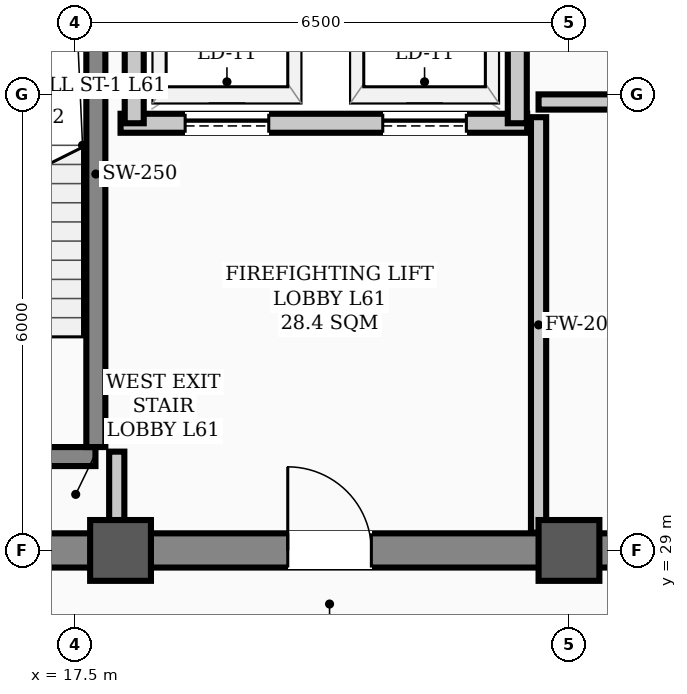
"""IFC4 building model, lengths in metres.
Left out: names, types, materials, properties, quantities, classifications, styles, units other than length and angle.
Written with IfcOpenShell. Run it as: python <this file> out.ifc"""

import sys

from ifc_helpers import new_model, si_unit, direction, frame, frame_2d, origin, origin_2d, place, context, subcontext, project, spatial, rectangle, hollow_rectangle, extrude, element, fill, save


model = new_model("IFC4")
c1 = context("Model", 3, precision=1e-05, world=origin(), true_north=direction((0.0, 1.0)))
c2 = subcontext(c1, "Body", "Model", "MODEL_VIEW")
j1 = project(units=[si_unit("LENGTHUNIT", "METRE"), si_unit("PLANEANGLEUNIT", "RADIAN")], contexts=[c1])
p1 = place(None, origin())
s1 = spatial("IfcSite", under=j1, at=p1, CompositionType="ELEMENT")
p2 = place(p1, origin())
s2 = spatial("IfcBuilding", under=s1, at=p2, CompositionType="ELEMENT")
p3 = place(p2, frame((0.0, 0.0, 246.2)))
s3 = spatial("IfcBuildingStorey", under=s2, at=p3, CompositionType="ELEMENT", Elevation=246.2)
for number, where, z_axis, x_axis in (
    (1, (18.1, 29.0, 0.0), (0.0, 0.0, 1.0), (1.0, 0.0, 0.0)),
    (2, (24.0, 29.0, 0.0), (0.0, 0.0, 1.0), (1.0, 0.0, 0.0)),
):
    element("IfcColumn", number, at=place(p3, frame(where, z_axis=z_axis, x_axis=x_axis)), inside=s3, PredefinedType="COLUMN", context=c2, shape_type="SweptSolid", body=[
        extrude(hollow_rectangle(XDim=0.8, YDim=0.8, WallThickness=0.032, InnerFilletRadius=0.016, OuterFilletRadius=0.048, at=origin_2d()), origin(), (0.0, 0.0, 1.0), 3.9),
    ])
p4 = place(p3, frame((13.5, 29.0, 0.0), z_axis=(0.0, 0.0, 1.0), x_axis=(1.0, 0.0, 0.0)))
e3 = element("IfcWall", 3, at=p4, inside=s3, PredefinedType="SHEAR", context=c2, shape_type="SweptSolid", body=[
    extrude(rectangle(XDim=30.5, YDim=0.45, at=frame_2d((15.25, 0.0))), origin(), (0.0, 0.0, 1.0), 3.72),
])
p5 = place(p4, frame((1.75, 0.0, 0.0)))
e4 = element("IfcOpeningElement", 4, at=p5, cuts=e3, PredefinedType="OPENING", context=c2, shape_type="SweptSolid", body=[
    extrude(rectangle(XDim=1.1, YDim=2.08, at=frame_2d((0.55, 1.04))), frame((0.0, 0.235, 0.0), z_axis=(0.0, -1.0, 0.0), x_axis=(1.0, 0.0, 0.0)), (0.0, 0.0, 1.0), 0.47),
])
p6 = place(p4, frame((26.7, 0.0, 0.0)))
e5 = element("IfcOpeningElement", 5, at=p6, cuts=e3, PredefinedType="OPENING", context=c2, shape_type="SweptSolid", body=[
    extrude(rectangle(XDim=1.1, YDim=2.08, at=frame_2d((0.55, 1.04))), frame((0.0, 0.235, 0.0), z_axis=(0.0, -1.0, 0.0), x_axis=(1.0, 0.0, 0.0)), (0.0, 0.0, 1.0), 0.47),
])
p7 = place(p4, frame((6.8, 0.0, 0.0)))
e6 = element("IfcOpeningElement", 6, at=p7, cuts=e3, PredefinedType="OPENING", context=c2, shape_type="SweptSolid", body=[
    extrude(rectangle(XDim=1.1, YDim=2.08, at=frame_2d((0.55, 1.04))), frame((0.0, 0.235, 0.0), z_axis=(0.0, -1.0, 0.0), x_axis=(1.0, 0.0, 0.0)), (0.0, 0.0, 1.0), 0.47),
])
p8 = place(p4, frame((13.2, 0.0, 0.0)))
e7 = element("IfcOpeningElement", 7, at=p8, cuts=e3, PredefinedType="OPENING", context=c2, shape_type="SweptSolid", body=[
    extrude(rectangle(XDim=1.6, YDim=2.08, at=frame_2d((0.8, 1.04))), frame((0.0, 0.235, 0.0), z_axis=(0.0, -1.0, 0.0), x_axis=(1.0, 0.0, 0.0)), (0.0, 0.0, 1.0), 0.47),
])
p9 = place(p4, frame((19.5, 0.0, 0.0)))
e8 = element("IfcOpeningElement", 8, at=p9, cuts=e3, PredefinedType="OPENING", context=c2, shape_type="SweptSolid", body=[
    extrude(rectangle(XDim=0.9, YDim=2.08, at=frame_2d((0.45, 1.04))), frame((0.0, 0.235, 0.0), z_axis=(0.0, -1.0, 0.0), x_axis=(1.0, 0.0, 0.0)), (0.0, 0.0, 1.0), 0.47),
])
p10 = place(p4, frame((21.55, 0.0, 0.0)))
e9 = element("IfcOpeningElement", 9, at=p10, cuts=e3, PredefinedType="OPENING", context=c2, shape_type="SweptSolid", body=[
    extrude(rectangle(XDim=0.9, YDim=2.08, at=frame_2d((0.45, 1.04))), frame((0.0, 0.235, 0.0), z_axis=(0.0, -1.0, 0.0), x_axis=(1.0, 0.0, 0.0)), (0.0, 0.0, 1.0), 0.47),
])
p11 = place(p3, frame((14.43, 30.235, 0.0), z_axis=(0.0, 0.0, 1.0), x_axis=(1.0, 0.0, 0.0)))
e10 = element("IfcWall", 10, at=p11, inside=s3, PredefinedType="STANDARD", context=c2, shape_type="SweptSolid", body=[
    extrude(rectangle(XDim=3.34, YDim=0.25, at=frame_2d((1.67, 0.0))), origin(), (0.0, 0.0, 1.0), 3.72),
])
p12 = place(p11, frame((1.1, 0.0, 0.0)))
e11 = element("IfcOpeningElement", 11, at=p12, cuts=e10, PredefinedType="OPENING", context=c2, shape_type="SweptSolid", body=[
    extrude(rectangle(XDim=1.1, YDim=2.08, at=frame_2d((0.55, 1.04))), frame((0.0, 0.135, 0.0), z_axis=(0.0, -1.0, 0.0), x_axis=(1.0, 0.0, 0.0)), (0.0, 0.0, 1.0), 0.27),
])
p13 = place(p3, frame((17.775, 30.36, 0.0), z_axis=(0.0, 0.0, 1.0), x_axis=(0.0, 1.0, 0.0)))
e12 = element("IfcWall", 12, at=p13, inside=s3, PredefinedType="STANDARD", context=c2, shape_type="SweptSolid", body=[
    extrude(rectangle(XDim=7.184, YDim=0.25, at=frame_2d((3.592, 0.0))), origin(), (0.0, 0.0, 1.0), 3.72),
])
p14 = place(p3, frame((18.1, 34.62, 0.0), z_axis=(0.0, 0.0, 1.0), x_axis=(1.0, 0.0, 0.0)))
e13 = element("IfcWall", 13, at=p14, inside=s3, PredefinedType="STANDARD", context=c2, shape_type="SweptSolid", body=[
    extrude(rectangle(XDim=5.35, YDim=0.25, at=frame_2d((2.675, 0.0))), origin(), (0.0, 0.0, 1.0), 3.72),
])
p15 = place(p14, frame((0.85, 0.0, 0.0)))
e14 = element("IfcOpeningElement", 14, at=p15, cuts=e13, PredefinedType="OPENING", context=c2, shape_type="SweptSolid", body=[
    extrude(rectangle(XDim=1.1, YDim=2.08, at=frame_2d((0.55, 1.04))), frame((0.0, 0.135, 0.0), z_axis=(0.0, -1.0, 0.0), x_axis=(1.0, 0.0, 0.0)), (0.0, 0.0, 1.0), 0.27),
])
p16 = place(p14, frame((3.45, 0.0, 0.0)))
e15 = element("IfcOpeningElement", 15, at=p16, cuts=e13, PredefinedType="OPENING", context=c2, shape_type="SweptSolid", body=[
    extrude(rectangle(XDim=1.1, YDim=2.08, at=frame_2d((0.55, 1.04))), frame((0.0, 0.135, 0.0), z_axis=(0.0, -1.0, 0.0), x_axis=(1.0, 0.0, 0.0)), (0.0, 0.0, 1.0), 0.27),
])
for number, where, z_axis, x_axis in (
    (16, (18.28, 34.62, 0.0), (0.0, 0.0, 1.0), (0.0, 1.0, 0.0)),
    (17, (23.32, 34.62, 0.0), (0.0, 0.0, 1.0), (0.0, 1.0, 0.0)),
):
    element("IfcWall", number, at=place(p3, frame(where, z_axis=z_axis, x_axis=x_axis)), inside=s3, PredefinedType="STANDARD", context=c2, shape_type="SweptSolid", body=[
        extrude(rectangle(XDim=3.33, YDim=0.25, at=frame_2d((1.665, 0.0))), origin(), (0.0, 0.0, 1.0), 3.72),
    ])
p17 = place(p3, frame((23.6, 34.9, 0.0), z_axis=(0.0, 0.0, 1.0), x_axis=(1.0, 0.0, 0.0)))
e18 = element("IfcWall", 18, at=p17, inside=s3, PredefinedType="STANDARD", context=c2, shape_type="SweptSolid", body=[
    extrude(rectangle(XDim=8.18, YDim=0.2, at=frame_2d((4.09, 0.0))), origin(), (0.0, 0.0, 1.0), 3.72),
])
p18 = place(p17, frame((3.45, 0.0, 0.0)))
e19 = element("IfcOpeningElement", 19, at=p18, cuts=e18, PredefinedType="OPENING", context=c2, shape_type="SweptSolid", body=[
    extrude(rectangle(XDim=1.1, YDim=2.08, at=frame_2d((0.55, 1.04))), frame((0.0, 0.11, 0.0), z_axis=(0.0, -1.0, 0.0), x_axis=(1.0, 0.0, 0.0)), (0.0, 0.0, 1.0), 0.22),
])
p19 = place(p3, frame((18.05, 29.235, 0.0), z_axis=(0.0, 0.0, 1.0), x_axis=(0.0, 1.0, 0.0)))
e20 = element("IfcWall", 20, at=p19, inside=s3, PredefinedType="STANDARD", context=c2, shape_type="SweptSolid", body=[
    extrude(rectangle(XDim=1.065, YDim=0.2, at=frame_2d((0.532, 0.0))), origin(), (0.0, 0.0, 1.0), 3.35),
])
p20 = place(p3, frame((23.6, 29.235, 0.0), z_axis=(0.0, 0.0, 1.0), x_axis=(0.0, 1.0, 0.0)))
e21 = element("IfcWall", 21, at=p20, inside=s3, PredefinedType="STANDARD", context=c2, shape_type="SweptSolid", body=[
    extrude(rectangle(XDim=5.465, YDim=0.2, at=frame_2d((2.732, 0.0))), origin(), (0.0, 0.0, 1.0), 3.2),
])
p21 = place(p7, origin())
e22 = element("IfcDoor", 22, at=p21, inside=s3, OperationType="SINGLE_SWING_LEFT", PredefinedType="DOOR", context=c2, shape_type="SweptSolid", body=[
    extrude(rectangle(XDim=1.1, YDim=2.08, at=frame_2d((0.55, 1.04))), frame((0.0, 0.025, 0.0), z_axis=(0.0, -1.0, 0.0), x_axis=(1.0, 0.0, 0.0)), (0.0, 0.0, 1.0), 0.05),
])
fill(e6, e22)
p22 = place(p15, origin())
e23 = element("IfcDoor", 23, at=p22, inside=s3, OperationType="SLIDING_TO_LEFT", PredefinedType="DOOR", context=c2, shape_type="SweptSolid", body=[
    extrude(rectangle(XDim=1.1, YDim=2.08, at=frame_2d((0.55, 1.04))), frame((0.0, 0.025, 0.0), z_axis=(0.0, -1.0, 0.0), x_axis=(1.0, 0.0, 0.0)), (0.0, 0.0, 1.0), 0.05),
])
fill(e14, e23)
p23 = place(p16, origin())
e24 = element("IfcDoor", 24, at=p23, inside=s3, OperationType="SLIDING_TO_LEFT", PredefinedType="DOOR", context=c2, shape_type="SweptSolid", body=[
    extrude(rectangle(XDim=1.1, YDim=2.08, at=frame_2d((0.55, 1.04))), frame((0.0, 0.025, 0.0), z_axis=(0.0, -1.0, 0.0), x_axis=(1.0, 0.0, 0.0)), (0.0, 0.0, 1.0), 0.05),
])
fill(e15, e24)
save(model, sys.argv[1])
